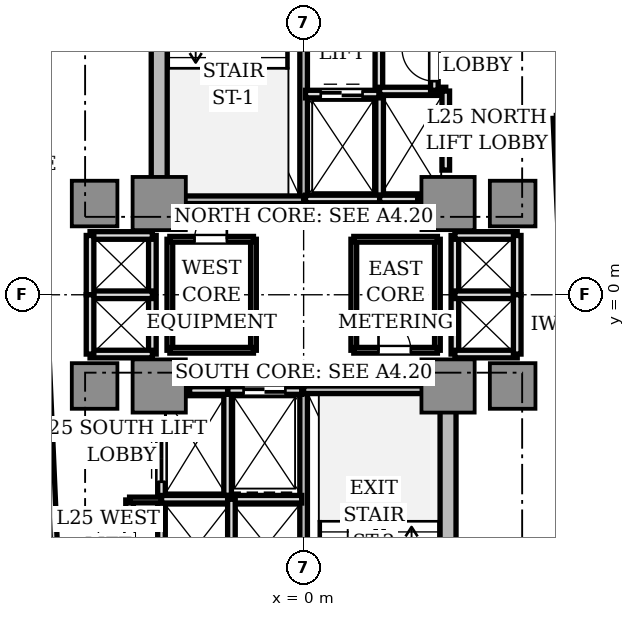
"""IFC4 building model, lengths in metres.
Left out: names, types, materials, properties, quantities, classifications, styles, units other than length and angle.
Written with IfcOpenShell. Run it as: python <this file> out.ifc"""

import sys

from ifc_helpers import new_model, si_unit, direction, frame, frame_2d, origin, origin_2d, place, context, subcontext, project, spatial, rectangle, extrude, source, transform, mapped, element, fill, save


model = new_model("IFC4")
c1 = context("Model", 3, precision=1e-05, world=origin(), true_north=direction((0.0, 1.0)))
c2 = subcontext(c1, "Body", "Model", "MODEL_VIEW")
j1 = project(units=[si_unit("LENGTHUNIT", "METRE"), si_unit("PLANEANGLEUNIT", "RADIAN")], contexts=[c1])
p1 = place(None, origin())
s1 = spatial("IfcSite", under=j1, at=p1, CompositionType="ELEMENT")
p2 = place(p1, origin())
s2 = spatial("IfcBuilding", under=s1, at=p2, CompositionType="ELEMENT")
p3 = place(p2, frame((0.0, 0.0, 93.55)))
s3 = spatial("IfcBuildingStorey", under=s2, at=p3, CompositionType="ELEMENT", Elevation=93.55)
for number, where, z_axis, x_axis in (
    (1, (-3.8, 2.85, 0.0), (0.0, 0.0, 1.0), (0.0, 1.0, 0.0)),
    (2, (3.8, -9.75, 0.0), (0.0, 0.0, 1.0), (0.0, 1.0, 0.0)),
):
    element("IfcWall", number, at=place(p3, frame(where, z_axis=z_axis, x_axis=x_axis)), inside=s3, PredefinedType="SHEAR", context=c2, shape_type="SweptSolid", body=[
        extrude(rectangle(XDim=6.9, YDim=0.42, at=frame_2d((3.45, 0.0))), origin(), (0.0, 0.0, 1.0), 3.11),
    ])
m1 = source(origin(), c2, "Body", "SweptSolid", [
    extrude(rectangle(XDim=1.4, YDim=1.4, at=origin_2d()), origin(), (0.0, 0.0, 1.0), 3.11),
])
for number, where, z_axis, x_axis in (
    (3, (-3.8, 2.4, 0.0), (0.0, 0.0, 1.0), (1.0, 0.0, 0.0)),
    (4, (3.8, 2.4, 0.0), (0.0, 0.0, 1.0), (1.0, 0.0, 0.0)),
    (5, (-3.8, -2.4, 0.0), (0.0, 0.0, 1.0), (1.0, 0.0, 0.0)),
    (6, (3.8, -2.4, 0.0), (0.0, 0.0, 1.0), (1.0, 0.0, 0.0)),
):
    element("IfcColumn", number, at=place(p3, frame(where, z_axis=z_axis, x_axis=x_axis)), inside=s3, PredefinedType="COLUMN", context=c2, shape_type="MappedRepresentation", body=[
        mapped(m1, transform((0.0, 0.0, 0.0), scale=1.0)),
    ])
m2 = source(origin(), c2, "Body", "SweptSolid", [
    extrude(rectangle(XDim=1.2, YDim=1.2, at=origin_2d()), origin(), (0.0, 0.0, 1.0), 3.11),
])
for number, where, z_axis, x_axis in (
    (7, (5.5, 2.4, 0.0), (0.0, 0.0, 1.0), (1.0, 0.0, 0.0)),
    (8, (-5.5, 2.4, 0.0), (0.0, 0.0, 1.0), (1.0, 0.0, 0.0)),
    (9, (5.5, -2.4, 0.0), (0.0, 0.0, 1.0), (1.0, 0.0, 0.0)),
    (10, (-5.5, -2.4, 0.0), (0.0, 0.0, 1.0), (1.0, 0.0, 0.0)),
):
    element("IfcColumn", number, at=place(p3, frame(where, z_axis=z_axis, x_axis=x_axis)), inside=s3, PredefinedType="COLUMN", context=c2, shape_type="MappedRepresentation", body=[
        mapped(m2, transform((0.0, 0.0, 0.0), scale=1.0)),
    ])
p4 = place(p3, frame((0.0, 2.5, 0.0), z_axis=(0.0, 0.0, 1.0), x_axis=(0.0, 1.0, 0.0)))
e11 = element("IfcWall", 11, at=p4, inside=s3, PredefinedType="SOLIDWALL", context=c2, shape_type="SweptSolid", body=[
    extrude(rectangle(XDim=7.68, YDim=0.2, at=frame_2d((3.84, 0.0))), origin(), (0.0, 0.0, 1.0), 3.11),
])
p5 = place(p4, frame((6.36, 0.0, 0.0)))
e12 = element("IfcOpeningElement", 12, at=p5, cuts=e11, PredefinedType="OPENING", context=c2, shape_type="SweptSolid", body=[
    extrude(rectangle(XDim=1.1, YDim=2.15, at=frame_2d((0.55, 1.075))), frame((0.0, 0.11, 0.0), z_axis=(0.0, -1.0, 0.0), x_axis=(1.0, 0.0, 0.0)), (0.0, 0.0, 1.0), 0.22),
])
p6 = place(p3, frame((-3.72, 2.5, 0.0), z_axis=(0.0, 0.0, 1.0), x_axis=(1.0, 0.0, 0.0)))
e13 = element("IfcWall", 13, at=p6, inside=s3, PredefinedType="SOLIDWALL", context=c2, shape_type="SweptSolid", body=[
    extrude(rectangle(XDim=3.72, YDim=0.2, at=frame_2d((1.86, 0.0))), origin(), (0.0, 0.0, 1.0), 3.11),
])
p7 = place(p3, frame((0.0, -10.18, 0.0), z_axis=(0.0, 0.0, 1.0), x_axis=(0.0, 1.0, 0.0)))
e14 = element("IfcWall", 14, at=p7, inside=s3, PredefinedType="SOLIDWALL", context=c2, shape_type="SweptSolid", body=[
    extrude(rectangle(XDim=7.68, YDim=0.2, at=frame_2d((3.84, 0.0))), origin(), (0.0, 0.0, 1.0), 3.11),
])
p8 = place(p7, frame((0.28, 0.0, 0.0)))
e15 = element("IfcOpeningElement", 15, at=p8, cuts=e14, PredefinedType="OPENING", context=c2, shape_type="SweptSolid", body=[
    extrude(rectangle(XDim=1.1, YDim=2.15, at=frame_2d((0.55, 1.075))), frame((0.0, 0.11, 0.0), z_axis=(0.0, -1.0, 0.0), x_axis=(1.0, 0.0, 0.0)), (0.0, 0.0, 1.0), 0.22),
])
p9 = place(p3, frame((0.0, -2.5, 0.0), z_axis=(0.0, 0.0, 1.0), x_axis=(1.0, 0.0, 0.0)))
e16 = element("IfcWall", 16, at=p9, inside=s3, PredefinedType="SOLIDWALL", context=c2, shape_type="SweptSolid", body=[
    extrude(rectangle(XDim=3.72, YDim=0.2, at=frame_2d((1.86, 0.0))), origin(), (0.0, 0.0, 1.0), 3.11),
])
p10 = place(p3, frame((1.98, 5.32, 0.0), z_axis=(0.0, 0.0, 1.0), x_axis=(0.0, 1.0, 0.0)))
e17 = element("IfcWall", 17, at=p10, inside=s3, PredefinedType="SOLIDWALL", context=c2, shape_type="SweptSolid", body=[
    extrude(rectangle(XDim=4.66, YDim=0.2, at=frame_2d((2.33, 0.0))), origin(), (0.0, 0.0, 1.0), 2.66),
])
p11 = place(p10, frame((3.04, 0.0, 0.0)))
e18 = element("IfcOpeningElement", 18, at=p11, cuts=e17, PredefinedType="OPENING", context=c2, shape_type="SweptSolid", body=[
    extrude(rectangle(XDim=0.85, YDim=2.1, at=frame_2d((0.425, 1.05))), frame((0.0, 0.11, 0.0), z_axis=(0.0, -1.0, 0.0), x_axis=(1.0, 0.0, 0.0)), (0.0, 0.0, 1.0), 0.22),
])
p12 = place(p3, frame((2.0, 2.5, 0.0), z_axis=(0.0, 0.0, 1.0), x_axis=(0.0, 1.0, 0.0)))
e19 = element("IfcWall", 19, at=p12, inside=s3, PredefinedType="SOLIDWALL", context=c2, shape_type="SweptSolid", body=[
    extrude(rectangle(XDim=2.78, YDim=0.2, at=frame_2d((1.39, 0.0))), origin(), (0.0, 0.0, 1.0), 2.66),
])
p13 = place(p3, frame((0.05, 2.52, 0.0), z_axis=(0.0, 0.0, 1.0), x_axis=(1.0, 0.0, 0.0)))
e20 = element("IfcWall", 20, at=p13, inside=s3, PredefinedType="SOLIDWALL", context=c2, shape_type="SweptSolid", body=[
    extrude(rectangle(XDim=1.95, YDim=0.2, at=frame_2d((0.975, 0.0))), origin(), (0.0, 0.0, 1.0), 2.66),
])
p14 = place(p3, frame((0.05, 5.28, 0.0), z_axis=(0.0, 0.0, 1.0), x_axis=(1.0, 0.0, 0.0)))
e21 = element("IfcWall", 21, at=p14, inside=s3, PredefinedType="SOLIDWALL", context=c2, shape_type="SweptSolid", body=[
    extrude(rectangle(XDim=1.93, YDim=0.2, at=frame_2d((0.965, 0.0))), origin(), (0.0, 0.0, 1.0), 2.66),
])
p15 = place(p14, frame((0.4, 0.0, 0.0)))
e22 = element("IfcOpeningElement", 22, at=p15, cuts=e21, PredefinedType="OPENING", context=c2, shape_type="SweptSolid", body=[
    extrude(rectangle(XDim=1.1, YDim=2.2, at=frame_2d((0.55, 1.1))), frame((0.0, 0.11, 0.0), z_axis=(0.0, -1.0, 0.0), x_axis=(1.0, 0.0, 0.0)), (0.0, 0.0, 1.0), 0.22),
])
p16 = place(p3, frame((-2.0, -5.28, 0.0), z_axis=(0.0, 0.0, 1.0), x_axis=(0.0, 1.0, 0.0)))
e23 = element("IfcWall", 23, at=p16, inside=s3, PredefinedType="SOLIDWALL", context=c2, shape_type="SweptSolid", body=[
    extrude(rectangle(XDim=2.78, YDim=0.2, at=frame_2d((1.39, 0.0))), origin(), (0.0, 0.0, 1.0), 2.66),
])
p17 = place(p3, frame((-2.0, -2.52, 0.0), z_axis=(0.0, 0.0, 1.0), x_axis=(1.0, 0.0, 0.0)))
e24 = element("IfcWall", 24, at=p17, inside=s3, PredefinedType="SOLIDWALL", context=c2, shape_type="SweptSolid", body=[
    extrude(rectangle(XDim=1.95, YDim=0.2, at=frame_2d((0.975, 0.0))), origin(), (0.0, 0.0, 1.0), 2.66),
])
p18 = place(p17, frame((0.42, 0.0, 0.0)))
e25 = element("IfcOpeningElement", 25, at=p18, cuts=e24, PredefinedType="OPENING", context=c2, shape_type="SweptSolid", body=[
    extrude(rectangle(XDim=1.1, YDim=2.2, at=frame_2d((0.55, 1.1))), frame((0.0, 0.11, 0.0), z_axis=(0.0, -1.0, 0.0), x_axis=(1.0, 0.0, 0.0)), (0.0, 0.0, 1.0), 0.22),
])
p19 = place(p3, frame((2.0, 2.52, 0.0), z_axis=(0.0, 0.0, 1.0), x_axis=(1.0, 0.0, 0.0)))
e26 = element("IfcWall", 26, at=p19, inside=s3, PredefinedType="SOLIDWALL", context=c2, shape_type="SweptSolid", body=[
    extrude(rectangle(XDim=1.0, YDim=0.2, at=frame_2d((0.5, 0.0))), origin(), (0.0, 0.0, 1.0), 2.66),
])
p20 = place(p3, frame((2.0, 5.36, 0.0), z_axis=(0.0, 0.0, 1.0), x_axis=(1.0, 0.0, 0.0)))
e27 = element("IfcWall", 27, at=p20, inside=s3, PredefinedType="SOLIDWALL", context=c2, shape_type="SweptSolid", body=[
    extrude(rectangle(XDim=1.74, YDim=0.2, at=frame_2d((0.87, 0.0))), origin(), (0.0, 0.0, 1.0), 2.66),
])
p21 = place(p3, frame((3.74, 3.28, 0.0), z_axis=(0.0, 0.0, 1.0), x_axis=(0.0, 1.0, 0.0)))
e28 = element("IfcWall", 28, at=p21, inside=s3, PredefinedType="SOLIDWALL", context=c2, shape_type="SweptSolid", body=[
    extrude(rectangle(XDim=2.08, YDim=0.2, at=frame_2d((1.04, 0.0))), origin(), (0.0, 0.0, 1.0), 2.66),
])
p22 = place(p21, frame((0.44, 0.0, 0.0)))
e29 = element("IfcOpeningElement", 29, at=p22, cuts=e28, PredefinedType="OPENING", context=c2, shape_type="SweptSolid", body=[
    extrude(rectangle(XDim=1.2, YDim=2.2, at=frame_2d((0.6, 1.1))), frame((0.0, 0.11, 0.0), z_axis=(0.0, -1.0, 0.0), x_axis=(1.0, 0.0, 0.0)), (0.0, 0.0, 1.0), 0.22),
])
p23 = place(p3, frame((-3.0, -2.52, 0.0), z_axis=(0.0, 0.0, 1.0), x_axis=(1.0, 0.0, 0.0)))
e30 = element("IfcWall", 30, at=p23, inside=s3, PredefinedType="SOLIDWALL", context=c2, shape_type="SweptSolid", body=[
    extrude(rectangle(XDim=1.0, YDim=0.2, at=frame_2d((0.5, 0.0))), origin(), (0.0, 0.0, 1.0), 2.66),
])
p24 = place(p3, frame((-3.74, -5.36, 0.0), z_axis=(0.0, 0.0, 1.0), x_axis=(0.0, 1.0, 0.0)))
e31 = element("IfcWall", 31, at=p24, inside=s3, PredefinedType="SOLIDWALL", context=c2, shape_type="SweptSolid", body=[
    extrude(rectangle(XDim=2.08, YDim=0.2, at=frame_2d((1.04, 0.0))), origin(), (0.0, 0.0, 1.0), 2.66),
])
p25 = place(p24, frame((0.44, 0.0, 0.0)))
e32 = element("IfcOpeningElement", 32, at=p25, cuts=e31, PredefinedType="OPENING", context=c2, shape_type="SweptSolid", body=[
    extrude(rectangle(XDim=1.2, YDim=2.2, at=frame_2d((0.6, 1.1))), frame((0.0, 0.11, 0.0), z_axis=(0.0, -1.0, 0.0), x_axis=(1.0, 0.0, 0.0)), (0.0, 0.0, 1.0), 0.22),
])
p26 = place(p3, frame((-3.74, -7.86, 0.0), z_axis=(0.0, 0.0, 1.0), x_axis=(0.0, 1.0, 0.0)))
e33 = element("IfcWall", 33, at=p26, inside=s3, PredefinedType="SOLIDWALL", context=c2, shape_type="SweptSolid", body=[
    extrude(rectangle(XDim=2.48, YDim=0.2, at=frame_2d((1.24, 0.0))), origin(), (0.0, 0.0, 1.0), 2.66),
])
p27 = place(p3, frame((-3.74, -5.38, 0.0), z_axis=(0.0, 0.0, 1.0), x_axis=(1.0, 0.0, 0.0)))
e34 = element("IfcWall", 34, at=p27, inside=s3, PredefinedType="SOLIDWALL", context=c2, shape_type="SweptSolid", body=[
    extrude(rectangle(XDim=3.69, YDim=0.2, at=frame_2d((1.845, 0.0))), origin(), (0.0, 0.0, 1.0), 2.66),
])
p28 = place(p3, frame((-1.9, -7.86, 0.0), z_axis=(0.0, 0.0, 1.0), x_axis=(0.0, 1.0, 0.0)))
e35 = element("IfcWall", 35, at=p28, inside=s3, PredefinedType="SOLIDWALL", context=c2, shape_type="SweptSolid", body=[
    extrude(rectangle(XDim=2.48, YDim=0.2, at=frame_2d((1.24, 0.0))), origin(), (0.0, 0.0, 1.0), 2.66),
])
p29 = place(p3, frame((3.98, -1.56, 0.0), z_axis=(0.0, 0.0, 1.0), x_axis=(0.0, 1.0, 0.0)))
e36 = element("IfcWall", 36, at=p29, inside=s3, PredefinedType="SOLIDWALL", context=c2, shape_type="SweptSolid", body=[
    extrude(rectangle(XDim=3.12, YDim=0.2, at=frame_2d((1.56, 0.0))), origin(), (0.0, 0.0, 1.0), 2.28),
])
for number, where, z_axis, x_axis in (
    (37, (3.98, 1.56, 0.0), (0.0, 0.0, 1.0), (1.0, 0.0, 0.0)),
    (38, (3.98, -1.56, 0.0), (0.0, 0.0, 1.0), (1.0, 0.0, 0.0)),
    (39, (3.98, 0.0, 0.0), (0.0, 0.0, 1.0), (1.0, 0.0, 0.0)),
):
    element("IfcWall", number, at=place(p3, frame(where, z_axis=z_axis, x_axis=x_axis)), inside=s3, PredefinedType="SOLIDWALL", context=c2, shape_type="SweptSolid", body=[
        extrude(rectangle(XDim=1.64, YDim=0.2, at=frame_2d((0.82, 0.0))), origin(), (0.0, 0.0, 1.0), 2.66),
    ])
for number, where, z_axis, x_axis in (
    (40, (5.62, 0.0, 0.0), (0.0, 0.0, 1.0), (0.0, 1.0, 0.0)),
    (41, (5.62, -1.56, 0.0), (0.0, 0.0, 1.0), (0.0, 1.0, 0.0)),
):
    element("IfcWall", number, at=place(p3, frame(where, z_axis=z_axis, x_axis=x_axis)), inside=s3, PredefinedType="SOLIDWALL", context=c2, shape_type="SweptSolid", body=[
        extrude(rectangle(XDim=1.56, YDim=0.2, at=frame_2d((0.78, 0.0))), origin(), (0.0, 0.0, 1.0), 2.66),
    ])
p30 = place(p3, frame((-3.98, -1.56, 0.0), z_axis=(0.0, 0.0, 1.0), x_axis=(0.0, 1.0, 0.0)))
e42 = element("IfcWall", 42, at=p30, inside=s3, PredefinedType="SOLIDWALL", context=c2, shape_type="SweptSolid", body=[
    extrude(rectangle(XDim=3.12, YDim=0.2, at=frame_2d((1.56, 0.0))), origin(), (0.0, 0.0, 1.0), 2.28),
])
for number, where, z_axis, x_axis in (
    (43, (-5.62, 1.56, 0.0), (0.0, 0.0, 1.0), (1.0, 0.0, 0.0)),
    (44, (-5.62, -1.56, 0.0), (0.0, 0.0, 1.0), (1.0, 0.0, 0.0)),
    (45, (-5.62, 0.0, 0.0), (0.0, 0.0, 1.0), (1.0, 0.0, 0.0)),
):
    element("IfcWall", number, at=place(p3, frame(where, z_axis=z_axis, x_axis=x_axis)), inside=s3, PredefinedType="SOLIDWALL", context=c2, shape_type="SweptSolid", body=[
        extrude(rectangle(XDim=1.64, YDim=0.2, at=frame_2d((0.82, 0.0))), origin(), (0.0, 0.0, 1.0), 2.66),
    ])
for number, where, z_axis, x_axis in (
    (46, (-5.62, 0.0, 0.0), (0.0, 0.0, 1.0), (0.0, 1.0, 0.0)),
    (47, (-5.62, -1.56, 0.0), (0.0, 0.0, 1.0), (0.0, 1.0, 0.0)),
):
    element("IfcWall", number, at=place(p3, frame(where, z_axis=z_axis, x_axis=x_axis)), inside=s3, PredefinedType="SOLIDWALL", context=c2, shape_type="SweptSolid", body=[
        extrude(rectangle(XDim=1.56, YDim=0.2, at=frame_2d((0.78, 0.0))), origin(), (0.0, 0.0, 1.0), 2.66),
    ])
p31 = place(p3, frame((3.44, 5.38, 0.0), z_axis=(0.0, 0.0, 1.0), x_axis=(0.0, 1.0, 0.0)))
e48 = element("IfcWall", 48, at=p31, inside=s3, PredefinedType="SOLIDWALL", context=c2, shape_type="SweptSolid", body=[
    extrude(rectangle(XDim=2.77, YDim=0.2, at=frame_2d((1.385, 0.0))), origin(), (0.0, 0.0, 1.0), 2.66),
])
p32 = place(p31, frame((0.24, 0.0, 0.0)))
e49 = element("IfcOpeningElement", 49, at=p32, cuts=e48, PredefinedType="OPENING", context=c2, shape_type="SweptSolid", body=[
    extrude(rectangle(XDim=0.85, YDim=2.1, at=frame_2d((0.425, 1.05))), frame((0.0, 0.11, 0.0), z_axis=(0.0, -1.0, 0.0), x_axis=(1.0, 0.0, 0.0)), (0.0, 0.0, 1.0), 0.22),
])
p33 = place(p31, frame((1.62, 0.0, 0.0)))
e50 = element("IfcOpeningElement", 50, at=p33, cuts=e48, PredefinedType="OPENING", context=c2, shape_type="SweptSolid", body=[
    extrude(rectangle(XDim=0.85, YDim=2.1, at=frame_2d((0.425, 1.05))), frame((0.0, 0.11, 0.0), z_axis=(0.0, -1.0, 0.0), x_axis=(1.0, 0.0, 0.0)), (0.0, 0.0, 1.0), 0.22),
])
p34 = place(p3, frame((-4.58, -7.86, 0.0), z_axis=(0.0, 0.0, 1.0), x_axis=(0.0, 1.0, 0.0)))
e51 = element("IfcWall", 51, at=p34, inside=s3, PredefinedType="SOLIDWALL", context=c2, shape_type="SweptSolid", body=[
    extrude(rectangle(XDim=2.46, YDim=0.2, at=frame_2d((1.23, 0.0))), origin(), (0.0, 0.0, 1.0), 2.66),
])
p35 = place(p34, frame((0.2, 0.0, 0.0)))
e52 = element("IfcOpeningElement", 52, at=p35, cuts=e51, PredefinedType="OPENING", context=c2, shape_type="SweptSolid", body=[
    extrude(rectangle(XDim=0.85, YDim=2.1, at=frame_2d((0.425, 1.05))), frame((0.0, 0.11, 0.0), z_axis=(0.0, -1.0, 0.0), x_axis=(1.0, 0.0, 0.0)), (0.0, 0.0, 1.0), 0.22),
])
p36 = place(p34, frame((1.38, 0.0, 0.0)))
e53 = element("IfcOpeningElement", 53, at=p36, cuts=e51, PredefinedType="OPENING", context=c2, shape_type="SweptSolid", body=[
    extrude(rectangle(XDim=0.85, YDim=2.1, at=frame_2d((0.425, 1.05))), frame((0.0, 0.11, 0.0), z_axis=(0.0, -1.0, 0.0), x_axis=(1.0, 0.0, 0.0)), (0.0, 0.0, 1.0), 0.22),
])
p37 = place(p3, frame((-4.58, -5.4, 0.0), z_axis=(0.0, 0.0, 1.0), x_axis=(1.0, 0.0, 0.0)))
e54 = element("IfcWall", 54, at=p37, inside=s3, PredefinedType="PARTITIONING", context=c2, shape_type="SweptSolid", body=[
    extrude(rectangle(XDim=0.84, YDim=0.15, at=frame_2d((0.42, 0.0))), origin(), (0.0, 0.0, 1.0), 2.66),
])
p38 = place(p3, frame((-1.32, -1.46, 0.0), z_axis=(0.0, 0.0, 1.0), x_axis=(0.0, 1.0, 0.0)))
e55 = element("IfcWall", 55, at=p38, inside=s3, PredefinedType="PARTITIONING", context=c2, shape_type="SweptSolid", body=[
    extrude(rectangle(XDim=2.92, YDim=0.15, at=frame_2d((1.46, 0.0))), origin(), (0.0, 0.0, 1.0), 2.66),
])
p39 = place(p3, frame((-3.52, -1.46, 0.0), z_axis=(0.0, 0.0, 1.0), x_axis=(0.0, 1.0, 0.0)))
e56 = element("IfcWall", 56, at=p39, inside=s3, PredefinedType="PARTITIONING", context=c2, shape_type="SweptSolid", body=[
    extrude(rectangle(XDim=2.92, YDim=0.15, at=frame_2d((1.46, 0.0))), origin(), (0.0, 0.0, 1.0), 2.28),
])
p40 = place(p3, frame((-3.52, 1.46, 0.0), z_axis=(0.0, 0.0, 1.0), x_axis=(1.0, 0.0, 0.0)))
e57 = element("IfcWall", 57, at=p40, inside=s3, PredefinedType="PARTITIONING", context=c2, shape_type="SweptSolid", body=[
    extrude(rectangle(XDim=2.2, YDim=0.15, at=frame_2d((1.1, 0.0))), origin(), (0.0, 0.0, 1.0), 2.66),
])
p41 = place(p40, frame((0.65, 0.0, 0.0)))
e58 = element("IfcOpeningElement", 58, at=p41, cuts=e57, PredefinedType="OPENING", context=c2, shape_type="SweptSolid", body=[
    extrude(rectangle(XDim=0.85, YDim=2.1, at=frame_2d((0.425, 1.05))), frame((0.0, 0.085, 0.0), z_axis=(0.0, -1.0, 0.0), x_axis=(1.0, 0.0, 0.0)), (0.0, 0.0, 1.0), 0.17),
])
p42 = place(p3, frame((-3.52, -1.46, 0.0), z_axis=(0.0, 0.0, 1.0), x_axis=(1.0, 0.0, 0.0)))
e59 = element("IfcWall", 59, at=p42, inside=s3, PredefinedType="PARTITIONING", context=c2, shape_type="SweptSolid", body=[
    extrude(rectangle(XDim=2.2, YDim=0.15, at=frame_2d((1.1, 0.0))), origin(), (0.0, 0.0, 1.0), 2.66),
])
p43 = place(p3, frame((1.32, -1.46, 0.0), z_axis=(0.0, 0.0, 1.0), x_axis=(0.0, 1.0, 0.0)))
e60 = element("IfcWall", 60, at=p43, inside=s3, PredefinedType="PARTITIONING", context=c2, shape_type="SweptSolid", body=[
    extrude(rectangle(XDim=2.92, YDim=0.15, at=frame_2d((1.46, 0.0))), origin(), (0.0, 0.0, 1.0), 2.66),
])
p44 = place(p3, frame((3.52, -1.46, 0.0), z_axis=(0.0, 0.0, 1.0), x_axis=(0.0, 1.0, 0.0)))
e61 = element("IfcWall", 61, at=p44, inside=s3, PredefinedType="PARTITIONING", context=c2, shape_type="SweptSolid", body=[
    extrude(rectangle(XDim=2.92, YDim=0.15, at=frame_2d((1.46, 0.0))), origin(), (0.0, 0.0, 1.0), 2.28),
])
p45 = place(p3, frame((1.32, 1.46, 0.0), z_axis=(0.0, 0.0, 1.0), x_axis=(1.0, 0.0, 0.0)))
e62 = element("IfcWall", 62, at=p45, inside=s3, PredefinedType="PARTITIONING", context=c2, shape_type="SweptSolid", body=[
    extrude(rectangle(XDim=2.2, YDim=0.15, at=frame_2d((1.1, 0.0))), origin(), (0.0, 0.0, 1.0), 2.66),
])
p46 = place(p3, frame((1.32, -1.46, 0.0), z_axis=(0.0, 0.0, 1.0), x_axis=(1.0, 0.0, 0.0)))
e63 = element("IfcWall", 63, at=p46, inside=s3, PredefinedType="PARTITIONING", context=c2, shape_type="SweptSolid", body=[
    extrude(rectangle(XDim=2.2, YDim=0.15, at=frame_2d((1.1, 0.0))), origin(), (0.0, 0.0, 1.0), 2.66),
])
p47 = place(p46, frame((0.65, 0.0, 0.0)))
e64 = element("IfcOpeningElement", 64, at=p47, cuts=e63, PredefinedType="OPENING", context=c2, shape_type="SweptSolid", body=[
    extrude(rectangle(XDim=0.85, YDim=2.1, at=frame_2d((0.425, 1.05))), frame((0.0, 0.085, 0.0), z_axis=(0.0, -1.0, 0.0), x_axis=(1.0, 0.0, 0.0)), (0.0, 0.0, 1.0), 0.17),
])
p48 = place(p3, frame((7.129, -6.245, 0.0), z_axis=(0.0, 0.0, 1.0), x_axis=(-0.043608291235, 0.999048705988, 0.0)))
e65 = element("IfcWall", 65, at=p48, inside=s3, PredefinedType="PARTITIONING", context=c2, shape_type="SweptSolid", body=[
    extrude(rectangle(XDim=10.9, YDim=0.18, at=frame_2d((5.45, 0.0))), origin(), (0.0, 0.0, 1.0), 2.66),
])
p49 = place(p3, frame((-6.8, -1.298, 0.0), z_axis=(0.0, 0.0, 1.0), x_axis=(0.04359376056, -0.999049340143, 0.0)))
e66 = element("IfcWall", 66, at=p49, inside=s3, PredefinedType="PARTITIONING", context=c2, shape_type="SweptSolid", body=[
    extrude(rectangle(XDim=5.55, YDim=0.18, at=frame_2d((2.775, 0.0))), origin(), (0.0, 0.0, 1.0), 2.66),
])
m3 = source(origin(), c2, "Body", "SweptSolid", [
    extrude(rectangle(XDim=1.1, YDim=0.05, at=origin_2d()), origin(), (0.0, 0.0, 1.0), 2.2),
])
p50 = place(p15, frame((0.55, 0.0, 0.0)))
e67 = element("IfcDoor", 67, at=p50, inside=s3, OperationType="DOUBLE_DOOR_SLIDING", PredefinedType="DOOR", context=c2, shape_type="MappedRepresentation", body=[
    mapped(m3, transform((0.0, 0.0, 0.0), scale=1.0)),
])
fill(e22, e67)
p51 = place(p18, frame((0.55, 0.0, 0.0)))
e68 = element("IfcDoor", 68, at=p51, inside=s3, OperationType="DOUBLE_DOOR_SLIDING", PredefinedType="DOOR", context=c2, shape_type="MappedRepresentation", body=[
    mapped(m3, transform((0.0, 0.0, 0.0), scale=1.0)),
])
fill(e25, e68)
m4 = source(origin(), c2, "Body", "SweptSolid", [
    extrude(rectangle(XDim=1.2, YDim=0.05, at=origin_2d()), origin(), (0.0, 0.0, 1.0), 2.2),
])
p52 = place(p22, frame((0.6, 0.0, 0.0)))
e69 = element("IfcDoor", 69, at=p52, inside=s3, OperationType="DOUBLE_DOOR_SLIDING", PredefinedType="DOOR", context=c2, shape_type="MappedRepresentation", body=[
    mapped(m4, transform((0.0, 0.0, 0.0), scale=1.0)),
])
fill(e29, e69)
p53 = place(p25, frame((0.6, 0.0, 0.0)))
e70 = element("IfcDoor", 70, at=p53, inside=s3, OperationType="DOUBLE_DOOR_SLIDING", PredefinedType="DOOR", context=c2, shape_type="MappedRepresentation", body=[
    mapped(m4, transform((0.0, 0.0, 0.0), scale=1.0)),
])
fill(e32, e70)
m5 = source(origin(), c2, "Body", "SweptSolid", [
    extrude(rectangle(XDim=0.85, YDim=0.05, at=origin_2d()), origin(), (0.0, 0.0, 1.0), 2.1),
])
p54 = place(p32, frame((0.425, 0.0, 0.0)))
e71 = element("IfcDoor", 71, at=p54, inside=s3, OperationType="SINGLE_SWING_RIGHT", PredefinedType="DOOR", context=c2, shape_type="MappedRepresentation", body=[
    mapped(m5, transform((0.0, 0.0, 0.0), scale=1.0)),
])
fill(e49, e71)
p55 = place(p36, frame((0.425, 0.0, 0.0)))
e72 = element("IfcDoor", 72, at=p55, inside=s3, OperationType="SINGLE_SWING_LEFT", PredefinedType="DOOR", context=c2, shape_type="MappedRepresentation", body=[
    mapped(m5, transform((0.0, 0.0, 0.0), scale=1.0)),
])
fill(e53, e72)
p56 = place(p41, frame((0.425, 0.0, 0.0)))
e73 = element("IfcDoor", 73, at=p56, inside=s3, OperationType="SINGLE_SWING_RIGHT", PredefinedType="DOOR", context=c2, shape_type="MappedRepresentation", body=[
    mapped(m5, transform((0.0, 0.0, 0.0), scale=1.0)),
])
fill(e58, e73)
p57 = place(p47, frame((0.425, 0.0, 0.0)))
e74 = element("IfcDoor", 74, at=p57, inside=s3, OperationType="SINGLE_SWING_LEFT", PredefinedType="DOOR", context=c2, shape_type="MappedRepresentation", body=[
    mapped(m5, transform((0.0, 0.0, 0.0), scale=1.0)),
])
fill(e64, e74)
save(model, sys.argv[1])
